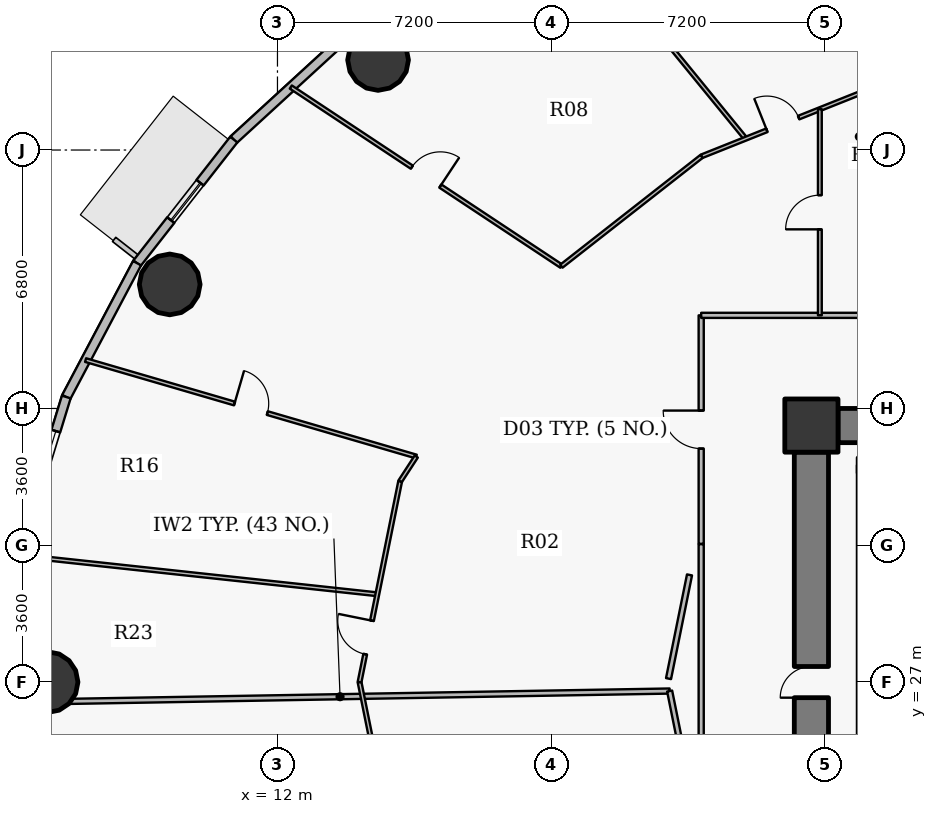
"""IFC4 building model, lengths in metres.
Left out: names, types, materials, properties, quantities, classifications, styles, units other than length and angle.
Written with IfcOpenShell. Run it as: python <this file> out.ifc"""

import sys

from ifc_helpers import new_model, si_unit, direction, frame, frame_2d, origin, origin_2d, place, context, subcontext, project, spatial, rectangle, hollow_circle, extrude, source, transform, mapped, element, fill, save


model = new_model("IFC4")
c1 = context("Model", 3, precision=1e-05, world=origin(), true_north=direction((0.0, 1.0)))
c2 = subcontext(c1, "Body", "Model", "MODEL_VIEW")
j1 = project(units=[si_unit("LENGTHUNIT", "METRE"), si_unit("PLANEANGLEUNIT", "RADIAN")], contexts=[c1])
p1 = place(None, origin())
s1 = spatial("IfcSite", under=j1, at=p1, CompositionType="ELEMENT")
p2 = place(p1, origin())
s2 = spatial("IfcBuilding", under=s1, at=p2, CompositionType="ELEMENT")
p3 = place(p2, frame((0.0, 0.0, 82.8)))
s3 = spatial("IfcBuildingStorey", under=s2, at=p3, CompositionType="ELEMENT", Elevation=82.8)
p4 = place(p3, frame((26.05, 33.75, 0.0), z_axis=(0.0, 0.0, 1.0), x_axis=(1.0, 0.0, 0.0)))
e1 = element("IfcColumn", 1, at=p4, inside=s3, PredefinedType="COLUMN", context=c2, shape_type="SweptSolid", body=[
    extrude(rectangle(XDim=1.4, YDim=1.4, at=origin_2d()), origin(), (0.0, 0.0, 1.0), 4.2),
])
p5 = place(p3, frame((26.75, 33.75, 0.0), z_axis=(0.0, 0.0, 1.0), x_axis=(1.0, 0.0, 0.0)))
e2 = element("IfcWall", 2, at=p5, inside=s3, PredefinedType="SHEAR", context=c2, shape_type="SweptSolid", body=[
    extrude(rectangle(XDim=18.5, YDim=0.9, at=frame_2d((9.25, 0.0))), origin(), (0.0, 0.0, 1.0), 3.35),
])
p6 = place(p3, frame((26.05, 20.95, 0.0), z_axis=(0.0, 0.0, 1.0), x_axis=(0.0, 1.0, 0.0)))
e3 = element("IfcWall", 3, at=p6, inside=s3, PredefinedType="SHEAR", context=c2, shape_type="SweptSolid", body=[
    extrude(rectangle(XDim=12.1, YDim=0.9, at=frame_2d((6.05, 0.0))), origin(), (0.0, 0.0, 1.0), 3.35),
])
p7 = place(p6, frame((5.64, 0.0, 0.0)))
e4 = element("IfcOpeningElement", 4, at=p7, cuts=e3, PredefinedType="OPENING", context=c2, shape_type="SweptSolid", body=[
    extrude(rectangle(XDim=0.82, YDim=2.1, at=origin_2d()), frame((0.41, 0.46, 1.05), z_axis=(0.0, -1.0, 0.0), x_axis=(1.0, 0.0, 0.0)), (0.0, 0.0, 1.0), 0.92),
])
for number, where, z_axis, x_axis in (
    (5, (14.647, 43.369, 0.0), (0.0, 0.0, 1.0), (1.0, 0.0, 0.0)),
    (6, (9.165, 37.464, 0.0), (0.0, 0.0, 1.0), (1.0, 0.0, 0.0)),
    (7, (5.95, 27.0, 0.0), (0.0, 0.0, 1.0), (1.0, 0.0, 0.0)),
):
    element("IfcColumn", number, at=place(p3, frame(where, z_axis=z_axis, x_axis=x_axis)), inside=s3, PredefinedType="COLUMN", context=c2, shape_type="SweptSolid", body=[
        extrude(hollow_circle(Radius=0.8, WallThickness=0.045, at=origin_2d()), origin(), (0.0, 0.0, 1.0), 4.2),
    ])
p8 = place(p3, frame((10.85, 41.275, 0.0), z_axis=(0.0, 0.0, 1.0), x_axis=(0.737116376281, 0.67576582321, 0.0)))
e8 = element("IfcWall", 8, at=p8, inside=s3, PredefinedType="SOLIDWALL", context=c2, shape_type="SweptSolid", body=[
    extrude(rectangle(XDim=4.294, YDim=0.24, at=frame_2d((2.147, 0.0))), origin(), (0.0, 0.0, 1.0), 3.9),
])
p9 = place(p3, frame((8.305, 38.023, 0.0), z_axis=(0.0, 0.0, 1.0), x_axis=(0.616295508253, 0.787514981767, 0.0)))
e9 = element("IfcWall", 9, at=p9, inside=s3, PredefinedType="SOLIDWALL", context=c2, shape_type="SweptSolid", body=[
    extrude(rectangle(XDim=4.129, YDim=0.24, at=frame_2d((2.065, 0.0))), origin(), (0.0, 0.0, 1.0), 3.9),
])
p10 = place(p9, frame((1.44, 0.0, 0.9)))
e10 = element("IfcOpeningElement", 10, at=p10, cuts=e9, PredefinedType="OPENING", context=c2, shape_type="SweptSolid", body=[
    extrude(rectangle(XDim=1.25, YDim=1.65, at=origin_2d()), frame((0.625, 0.13, 0.825), z_axis=(0.0, -1.0, 0.0), x_axis=(1.0, 0.0, 0.0)), (0.0, 0.0, 1.0), 0.26),
])
p11 = place(p3, frame((6.442, 34.501, 0.0), z_axis=(0.0, 0.0, 1.0), x_axis=(0.467662443071, 0.883907144072, 0.0)))
e11 = element("IfcWall", 11, at=p11, inside=s3, PredefinedType="SOLIDWALL", context=c2, shape_type="SweptSolid", body=[
    extrude(rectangle(XDim=3.984, YDim=0.24, at=frame_2d((1.992, 0.0))), origin(), (0.0, 0.0, 1.0), 3.9),
])
p12 = place(p3, frame((5.307, 30.797, 0.0), z_axis=(0.0, 0.0, 1.0), x_axis=(0.293111631758, 0.956078224482, 0.0)))
e12 = element("IfcWall", 12, at=p12, inside=s3, PredefinedType="SOLIDWALL", context=c2, shape_type="SweptSolid", body=[
    extrude(rectangle(XDim=3.875, YDim=0.24, at=frame_2d((1.938, 0.0))), origin(), (0.0, 0.0, 1.0), 3.9),
])
p13 = place(p12, frame((0.938, 0.0, 0.9)))
e13 = element("IfcOpeningElement", 13, at=p13, cuts=e12, PredefinedType="OPENING", context=c2, shape_type="SweptSolid", body=[
    extrude(rectangle(XDim=2.0, YDim=1.75, at=origin_2d()), frame((1.0, 0.13, 0.875), z_axis=(0.0, -1.0, 0.0), x_axis=(1.0, 0.0, 0.0)), (0.0, 0.0, 1.0), 0.26),
])
p14 = place(p3, frame((4.974, 26.466, 0.0), z_axis=(0.0, 0.0, 1.0), x_axis=(0.999851881099, 0.017210922752, 0.0)))
e14 = element("IfcWall", 14, at=p14, inside=s3, PredefinedType="PARTITIONING", context=c2, shape_type="SweptSolid", body=[
    extrude(rectangle(XDim=17.349, YDim=0.135, at=frame_2d((8.674, 0.0))), origin(), (0.0, 0.0, 1.0), 3.235),
])
p15 = place(p3, frame((5.254, 30.324, 0.0), z_axis=(0.0, 0.0, 1.0), x_axis=(0.994205925685, -0.107492219871, 0.0)))
e15 = element("IfcWall", 15, at=p15, inside=s3, PredefinedType="PARTITIONING", context=c2, shape_type="SweptSolid", body=[
    extrude(rectangle(XDim=9.428, YDim=0.1, at=frame_2d((4.714, 0.0))), origin(), (0.0, 0.0, 1.0), 3.285),
])
p16 = place(p3, frame((6.951, 35.473, 0.0), z_axis=(0.0, 0.0, 1.0), x_axis=(0.959994871391, -0.280017583204, 0.0)))
e16 = element("IfcWall", 16, at=p16, inside=s3, PredefinedType="PARTITIONING", context=c2, shape_type="SweptSolid", body=[
    extrude(rectangle(XDim=9.064, YDim=0.1, at=frame_2d((4.532, 0.0))), origin(), (0.0, 0.0, 1.0), 3.285),
])
p17 = place(p16, frame((4.082, 0.0, 0.0)))
e17 = element("IfcOpeningElement", 17, at=p17, cuts=e16, PredefinedType="OPENING", context=c2, shape_type="SweptSolid", body=[
    extrude(rectangle(XDim=0.9, YDim=2.1, at=origin_2d()), frame((0.45, 0.06, 1.05), z_axis=(0.0, -1.0, 0.0), x_axis=(1.0, 0.0, 0.0)), (0.0, 0.0, 1.0), 0.12),
])
p18 = place(p3, frame((12.351, 42.657, 0.0), z_axis=(0.0, 0.0, 1.0), x_axis=(0.833801361147, -0.552064570633, 0.0)))
e18 = element("IfcWall", 18, at=p18, inside=s3, PredefinedType="PARTITIONING", context=c2, shape_type="SweptSolid", body=[
    extrude(rectangle(XDim=8.538, YDim=0.1, at=frame_2d((4.269, 0.0))), origin(), (0.0, 0.0, 1.0), 3.285),
])
p19 = place(p18, frame((3.819, 0.0, 0.0)))
e19 = element("IfcOpeningElement", 19, at=p19, cuts=e18, PredefinedType="OPENING", context=c2, shape_type="SweptSolid", body=[
    extrude(rectangle(XDim=0.9, YDim=2.1, at=origin_2d()), frame((0.45, 0.06, 1.05), z_axis=(0.0, -1.0, 0.0), x_axis=(1.0, 0.0, 0.0)), (0.0, 0.0, 1.0), 0.12),
])
p20 = place(p3, frame((14.16, 27.0, 0.0), z_axis=(0.0, 0.0, 1.0), x_axis=(0.198292702032, -0.980142848936, 0.0)))
e20 = element("IfcWall", 20, at=p20, inside=s3, PredefinedType="PARTITIONING", context=c2, shape_type="SweptSolid", body=[
    extrude(rectangle(XDim=5.392, YDim=0.1, at=frame_2d((2.696, 0.0))), origin(), (0.0, 0.0, 1.0), 3.235),
])
p21 = place(p20, frame((1.887, 0.0, 0.0)))
e21 = element("IfcOpeningElement", 21, at=p21, cuts=e20, PredefinedType="OPENING", context=c2, shape_type="SweptSolid", body=[
    extrude(rectangle(XDim=0.9, YDim=2.1, at=origin_2d()), frame((0.45, 0.06, 1.05), z_axis=(0.0, -1.0, 0.0), x_axis=(1.0, 0.0, 0.0)), (0.0, 0.0, 1.0), 0.12),
])
p22 = place(p3, frame((14.16, 27.0, 0.0), z_axis=(0.0, 0.0, 1.0), x_axis=(0.198292702032, 0.980142848936, 0.0)))
e22 = element("IfcWall", 22, at=p22, inside=s3, PredefinedType="PARTITIONING", context=c2, shape_type="SweptSolid", body=[
    extrude(rectangle(XDim=5.392, YDim=0.1, at=frame_2d((2.696, 0.0))), origin(), (0.0, 0.0, 1.0), 3.235),
])
p23 = place(p22, frame((0.749, 0.0, 0.0)))
e23 = element("IfcOpeningElement", 23, at=p23, cuts=e22, PredefinedType="OPENING", context=c2, shape_type="SweptSolid", body=[
    extrude(rectangle(XDim=0.9, YDim=2.1, at=origin_2d()), frame((0.45, 0.06, 1.05), z_axis=(0.0, -1.0, 0.0), x_axis=(1.0, 0.0, 0.0)), (0.0, 0.0, 1.0), 0.12),
])
p24 = place(p3, frame((15.229, 32.284, 0.0), z_axis=(0.0, 0.0, 1.0), x_axis=(0.545297991952, 0.838242268067, 0.0)))
e24 = element("IfcWall", 24, at=p24, inside=s3, PredefinedType="PARTITIONING", context=c2, shape_type="SweptSolid", body=[
    extrude(rectangle(XDim=0.776, YDim=0.1, at=frame_2d((0.388, 0.0))), origin(), (0.0, 0.0, 1.0), 3.9),
])
p25 = place(p3, frame((19.314, 47.425, 0.0), z_axis=(0.0, 0.0, 1.0), x_axis=(0.63263945268, -0.774446462264, 0.0)))
e25 = element("IfcWall", 25, at=p25, inside=s3, PredefinedType="PARTITIONING", context=c2, shape_type="SweptSolid", body=[
    extrude(rectangle(XDim=7.913, YDim=0.1, at=frame_2d((3.956, 0.0))), origin(), (0.0, 0.0, 1.0), 3.285),
])
p26 = place(p3, frame((19.47, 37.944, 0.0), z_axis=(0.0, 0.0, 1.0), x_axis=(0.787352286351, 0.616503347256, 0.0)))
e26 = element("IfcWall", 26, at=p26, inside=s3, PredefinedType="PARTITIONING", context=c2, shape_type="SweptSolid", body=[
    extrude(rectangle(XDim=4.69, YDim=0.1, at=frame_2d((2.345, 0.0))), origin(), (0.0, 0.0, 1.0), 3.235),
])
p27 = place(p3, frame((23.15, 30.638, 0.0), z_axis=(0.0, 0.0, 1.0), x_axis=(0.0, 1.0, 0.0)))
e27 = element("IfcWall", 27, at=p27, inside=s3, PredefinedType="PARTITIONING", context=c2, shape_type="SweptSolid", body=[
    extrude(rectangle(XDim=6.011, YDim=0.135, at=frame_2d((3.006, 0.0))), origin(), (0.0, 0.0, 1.0), 3.235),
])
p28 = place(p27, frame((2.506, 0.0, 0.0)))
e28 = element("IfcOpeningElement", 28, at=p28, cuts=e27, PredefinedType="OPENING", context=c2, shape_type="SweptSolid", body=[
    extrude(rectangle(XDim=1.0, YDim=2.15, at=origin_2d()), frame((0.5, 0.078, 1.075), z_axis=(0.0, -1.0, 0.0), x_axis=(1.0, 0.0, 0.0)), (0.0, 0.0, 1.0), 0.155),
])
p29 = place(p3, frame((23.15, 36.65, 0.0), z_axis=(0.0, 0.0, 1.0), x_axis=(1.0, 0.0, 0.0)))
e29 = element("IfcWall", 29, at=p29, inside=s3, PredefinedType="PARTITIONING", context=c2, shape_type="SweptSolid", body=[
    extrude(rectangle(XDim=7.171, YDim=0.135, at=frame_2d((3.586, 0.0))), origin(), (0.0, 0.0, 1.0), 3.235),
])
p30 = place(p3, frame((23.163, 40.835, 0.0), z_axis=(0.0, 0.0, 1.0), x_axis=(0.928799979038, 0.370581433613, 0.0)))
e30 = element("IfcWall", 30, at=p30, inside=s3, PredefinedType="PARTITIONING", context=c2, shape_type="SweptSolid", body=[
    extrude(rectangle(XDim=6.555, YDim=0.1, at=frame_2d((3.278, 0.0))), origin(), (0.0, 0.0, 1.0), 3.235),
])
p31 = place(p30, frame((1.847, 0.0, 0.0)))
e31 = element("IfcOpeningElement", 31, at=p31, cuts=e30, PredefinedType="OPENING", context=c2, shape_type="SweptSolid", body=[
    extrude(rectangle(XDim=0.9, YDim=2.1, at=origin_2d()), frame((0.45, 0.06, 1.05), z_axis=(0.0, -1.0, 0.0), x_axis=(1.0, 0.0, 0.0)), (0.0, 0.0, 1.0), 0.12),
])
p32 = place(p3, frame((26.272, 36.65, 0.0), z_axis=(0.0, 0.0, 1.0), x_axis=(0.0, 1.0, 0.0)))
e32 = element("IfcWall", 32, at=p32, inside=s3, PredefinedType="PARTITIONING", context=c2, shape_type="SweptSolid", body=[
    extrude(rectangle(XDim=5.426, YDim=0.1, at=frame_2d((2.713, 0.0))), origin(), (0.0, 0.0, 1.0), 3.9),
])
p33 = place(p32, frame((2.263, 0.0, 0.0)))
e33 = element("IfcOpeningElement", 33, at=p33, cuts=e32, PredefinedType="OPENING", context=c2, shape_type="SweptSolid", body=[
    extrude(rectangle(XDim=0.9, YDim=2.1, at=origin_2d()), frame((0.45, 0.06, 1.05), z_axis=(0.0, -1.0, 0.0), x_axis=(1.0, 0.0, 0.0)), (0.0, 0.0, 1.0), 0.12),
])
p34 = place(p3, frame((26.641, 50.166, 0.0), z_axis=(0.0, 0.0, 1.0), x_axis=(0.374600258899, -0.927186413852, 0.0)))
e34 = element("IfcWall", 34, at=p34, inside=s3, PredefinedType="PARTITIONING", context=c2, shape_type="SweptSolid", body=[
    extrude(rectangle(XDim=13.945, YDim=0.135, at=frame_2d((6.972, 0.0))), origin(), (0.0, 0.0, 1.0), 3.235),
])
p35 = place(p3, frame((23.15, 23.372, 0.0), z_axis=(0.0, 0.0, 1.0), x_axis=(0.0, 1.0, 0.0)))
e35 = element("IfcWall", 35, at=p35, inside=s3, PredefinedType="PARTITIONING", context=c2, shape_type="SweptSolid", body=[
    extrude(rectangle(XDim=7.257, YDim=0.135, at=frame_2d((3.628, 0.0))), origin(), (0.0, 0.0, 1.0), 3.235),
])
p36 = place(p3, frame((26.74, 34.2, 0.0), z_axis=(0.0, 0.0, 1.0), x_axis=(-1.0, 0.0, 0.0)))
e36 = element("IfcWall", 36, at=p36, inside=s3, PredefinedType="PARTITIONING", context=c2, shape_type="SweptSolid", body=[
    extrude(rectangle(XDim=1.14, YDim=0.135, at=frame_2d((0.57, 0.0))), origin(), (0.0, 0.0, 1.0), 3.235),
])
p37 = place(p3, frame((25.6, 33.893, 0.0), z_axis=(0.0, 0.0, 1.0), x_axis=(0.0, -1.0, 0.0)))
e37 = element("IfcWall", 37, at=p37, inside=s3, PredefinedType="PARTITIONING", context=c2, shape_type="SweptSolid", body=[
    extrude(rectangle(XDim=0.833, YDim=0.135, at=frame_2d((0.416, 0.0))), origin(), (0.0, 0.0, 1.0), 3.9),
])
p38 = place(p3, frame((22.843, 29.82, 0.0), z_axis=(0.0, 0.0, 1.0), x_axis=(-0.198274261102, -0.98014657954, 0.0)))
e38 = element("IfcWall", 38, at=p38, inside=s3, PredefinedType="PARTITIONING", context=c2, shape_type="SweptSolid", body=[
    extrude(rectangle(XDim=2.784, YDim=0.135, at=frame_2d((1.392, 0.0))), origin(), (0.0, 0.0, 1.0), 3.235),
])
p39 = place(p3, frame((22.32, 26.765, 0.0), z_axis=(0.0, 0.0, 1.0), x_axis=(0.198287516938, -0.980143897918, 0.0)))
e39 = element("IfcWall", 39, at=p39, inside=s3, PredefinedType="PARTITIONING", context=c2, shape_type="SweptSolid", body=[
    extrude(rectangle(XDim=2.637, YDim=0.135, at=frame_2d((1.319, 0.0))), origin(), (0.0, 0.0, 1.0), 3.9),
])
m1 = source(origin(), c2, "Body", "SweptSolid", [
    extrude(rectangle(XDim=2.0, YDim=1.75, at=origin_2d()), frame((1.0, 0.03, 0.875), z_axis=(0.0, -1.0, 0.0), x_axis=(1.0, 0.0, 0.0)), (0.0, 0.0, 1.0), 0.06),
])
p40 = place(p13, origin())
e40 = element("IfcWindow", 40, at=p40, inside=s3, PartitioningType="DOUBLE_PANEL_VERTICAL", PredefinedType="WINDOW", context=c2, shape_type="MappedRepresentation", body=[
    mapped(m1, transform((0.0, 0.0, 0.0), x_axis=(1.0, 0.0, 0.0), y_axis=(0.0, 1.0, 0.0), z_axis=(0.0, 0.0, 1.0), scale=1.0)),
])
fill(e13, e40)
m2 = source(origin(), c2, "Body", "SweptSolid", [
    extrude(rectangle(XDim=1.25, YDim=1.65, at=origin_2d()), frame((0.625, 0.03, 0.825), z_axis=(0.0, -1.0, 0.0), x_axis=(1.0, 0.0, 0.0)), (0.0, 0.0, 1.0), 0.06),
])
p41 = place(p10, origin())
e41 = element("IfcWindow", 41, at=p41, inside=s3, PartitioningType="SINGLE_PANEL", PredefinedType="WINDOW", context=c2, shape_type="MappedRepresentation", body=[
    mapped(m2, transform((0.0, 0.0, 0.0), x_axis=(1.0, 0.0, 0.0), y_axis=(0.0, 1.0, 0.0), z_axis=(0.0, 0.0, 1.0), scale=1.0)),
])
fill(e10, e41)
m3 = source(origin(), c2, "Body", "SweptSolid", [
    extrude(rectangle(XDim=0.82, YDim=2.1, at=origin_2d()), frame((0.41, 0.025, 1.05), z_axis=(0.0, -1.0, 0.0), x_axis=(1.0, 0.0, 0.0)), (0.0, 0.0, 1.0), 0.05),
])
p42 = place(p7, origin())
e42 = element("IfcDoor", 42, at=p42, inside=s3, OperationType="SINGLE_SWING_LEFT", PredefinedType="DOOR", context=c2, shape_type="MappedRepresentation", body=[
    mapped(m3, transform((0.0, 0.0, 0.0), x_axis=(1.0, 0.0, 0.0), y_axis=(0.0, 1.0, 0.0), z_axis=(0.0, 0.0, 1.0), scale=1.0)),
])
fill(e4, e42)
m4 = source(origin(), c2, "Body", "SweptSolid", [
    extrude(rectangle(XDim=1.0, YDim=2.15, at=origin_2d()), frame((0.5, 0.025, 1.075), z_axis=(0.0, -1.0, 0.0), x_axis=(1.0, 0.0, 0.0)), (0.0, 0.0, 1.0), 0.05),
])
p43 = place(p28, origin())
e43 = element("IfcDoor", 43, at=p43, inside=s3, OperationType="SINGLE_SWING_RIGHT", PredefinedType="DOOR", context=c2, shape_type="MappedRepresentation", body=[
    mapped(m4, transform((0.0, 0.0, 0.0), x_axis=(1.0, 0.0, 0.0), y_axis=(0.0, 1.0, 0.0), z_axis=(0.0, 0.0, 1.0), scale=1.0)),
])
fill(e28, e43)
m5 = source(origin(), c2, "Body", "SweptSolid", [
    extrude(rectangle(XDim=0.9, YDim=2.1, at=origin_2d()), frame((0.45, 0.025, 1.05), z_axis=(0.0, -1.0, 0.0), x_axis=(1.0, 0.0, 0.0)), (0.0, 0.0, 1.0), 0.05),
])
p44 = place(p31, origin())
e44 = element("IfcDoor", 44, at=p44, inside=s3, OperationType="SINGLE_SWING_LEFT", PredefinedType="DOOR", context=c2, shape_type="MappedRepresentation", body=[
    mapped(m5, transform((0.0, 0.0, 0.0), x_axis=(1.0, 0.0, 0.0), y_axis=(0.0, 1.0, 0.0), z_axis=(0.0, 0.0, 1.0), scale=1.0)),
])
fill(e31, e44)
p45 = place(p19, origin())
e45 = element("IfcDoor", 45, at=p45, inside=s3, OperationType="SINGLE_SWING_RIGHT", PredefinedType="DOOR", context=c2, shape_type="MappedRepresentation", body=[
    mapped(m5, transform((0.0, 0.0, 0.0), x_axis=(1.0, 0.0, 0.0), y_axis=(0.0, 1.0, 0.0), z_axis=(0.0, 0.0, 1.0), scale=1.0)),
])
fill(e19, e45)
p46 = place(p17, origin())
e46 = element("IfcDoor", 46, at=p46, inside=s3, OperationType="SINGLE_SWING_LEFT", PredefinedType="DOOR", context=c2, shape_type="MappedRepresentation", body=[
    mapped(m5, transform((0.0, 0.0, 0.0), x_axis=(1.0, 0.0, 0.0), y_axis=(0.0, 1.0, 0.0), z_axis=(0.0, 0.0, 1.0), scale=1.0)),
])
fill(e17, e46)
p47 = place(p23, origin())
e47 = element("IfcDoor", 47, at=p47, inside=s3, OperationType="SINGLE_SWING_RIGHT", PredefinedType="DOOR", context=c2, shape_type="MappedRepresentation", body=[
    mapped(m5, transform((0.0, 0.0, 0.0), x_axis=(1.0, 0.0, 0.0), y_axis=(0.0, 1.0, 0.0), z_axis=(0.0, 0.0, 1.0), scale=1.0)),
])
fill(e23, e47)
p48 = place(p33, origin())
e48 = element("IfcDoor", 48, at=p48, inside=s3, OperationType="SINGLE_SWING_LEFT", PredefinedType="DOOR", context=c2, shape_type="MappedRepresentation", body=[
    mapped(m5, transform((0.0, 0.0, 0.0), x_axis=(1.0, 0.0, 0.0), y_axis=(0.0, 1.0, 0.0), z_axis=(0.0, 0.0, 1.0), scale=1.0)),
])
fill(e33, e48)
save(model, sys.argv[1])
